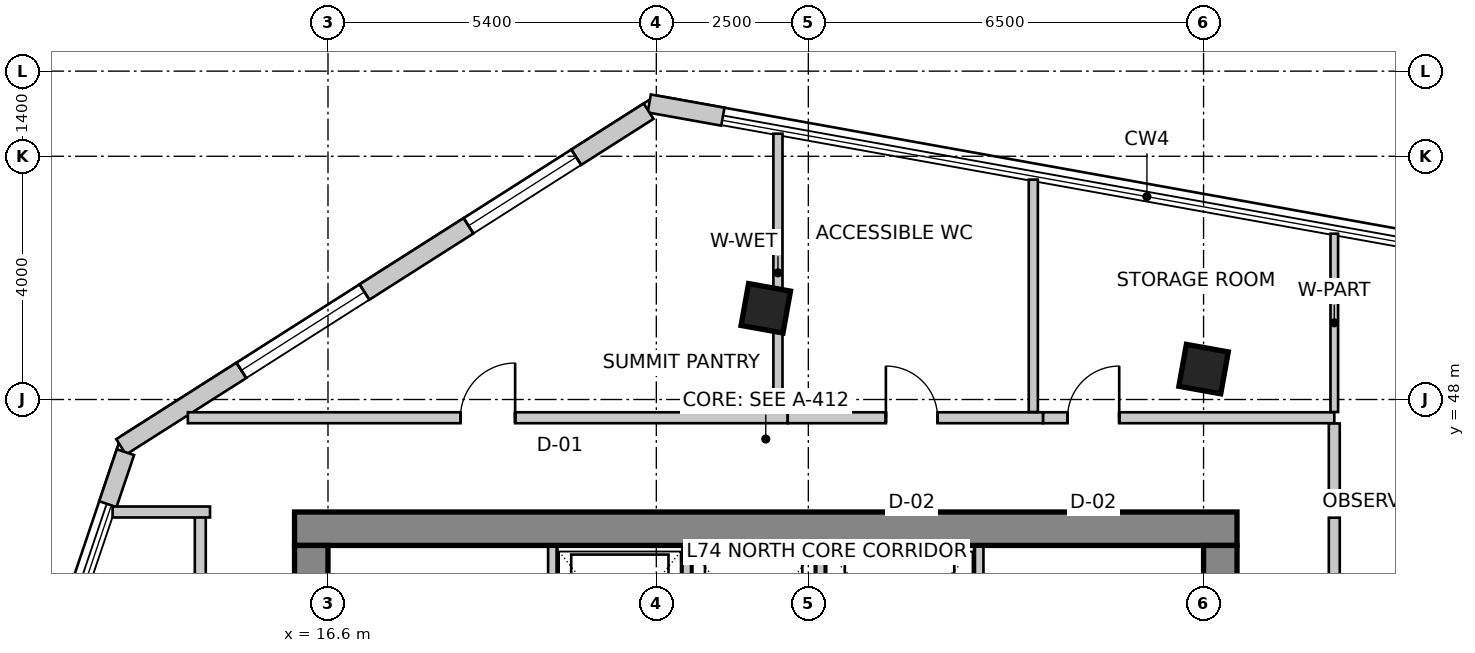
"""IFC4 building model, lengths in metres.
Left out: names, types, materials, properties, quantities, classifications, styles, units other than length and angle.
Written with IfcOpenShell. Run it as: python <this file> out.ifc"""

import sys

from ifc_helpers import new_model, si_unit, direction, frame, frame_2d, origin, origin_2d, place, context, subcontext, project, spatial, rectangle, extrude, source, transform, mapped, element, fill, save


model = new_model("IFC4")
c1 = context("Model", 3, precision=1e-05, world=origin(), true_north=direction((0.0, 1.0)))
c2 = subcontext(c1, "Body", "Model", "MODEL_VIEW")
j1 = project(units=[si_unit("LENGTHUNIT", "METRE"), si_unit("PLANEANGLEUNIT", "RADIAN")], contexts=[c1])
p1 = place(None, origin())
s1 = spatial("IfcSite", under=j1, at=p1, CompositionType="ELEMENT")
p2 = place(p1, origin())
s2 = spatial("IfcBuilding", under=s1, at=p2, CompositionType="ELEMENT")
p3 = place(p2, frame((0.0, 0.0, 288.9)))
s3 = spatial("IfcBuildingStorey", under=s2, at=p3, CompositionType="ELEMENT", Elevation=288.9)
p4 = place(p3, frame((16.05, 45.875, 0.0), z_axis=(0.0, 0.0, 1.0), x_axis=(1.0, 0.0, 0.0)))
e1 = element("IfcWall", 1, at=p4, inside=s3, PredefinedType="SHEAR", context=c2, shape_type="SweptSolid", body=[
    extrude(rectangle(XDim=15.5, YDim=0.55, at=frame_2d((7.75, 0.0))), origin(), (0.0, 0.0, 1.0), 3.6),
])
p5 = place(p3, frame((16.325, 34.2, 0.0), z_axis=(0.0, 0.0, 1.0), x_axis=(0.0, 1.0, 0.0)))
e2 = element("IfcWall", 2, at=p5, inside=s3, PredefinedType="SHEAR", context=c2, shape_type="SweptSolid", body=[
    extrude(rectangle(XDim=11.4, YDim=0.55, at=frame_2d((5.7, 0.0))), origin(), (0.0, 0.0, 1.0), 3.6),
])
m1 = source(origin(), c2, "Body", "SweptSolid", [
    extrude(rectangle(XDim=1.1, YDim=2.15, at=frame_2d((0.55, 1.075))), frame((0.0, 0.285, 0.0), z_axis=(0.0, -1.0, 0.0), x_axis=(1.0, 0.0, 0.0)), (0.0, 0.0, 1.0), 0.57),
])
p6 = place(p5, frame((7.15, 0.0, 0.0)))
e3 = element("IfcOpeningElement", 3, at=p6, cuts=e2, PredefinedType="OPENING", context=c2, shape_type="MappedRepresentation", body=[
    mapped(m1, transform((0.0, 0.0, 0.0), scale=1.0)),
])
p7 = place(p3, frame((31.275, 34.2, 0.0), z_axis=(0.0, 0.0, 1.0), x_axis=(0.0, 1.0, 0.0)))
e4 = element("IfcWall", 4, at=p7, inside=s3, PredefinedType="SHEAR", context=c2, shape_type="SweptSolid", body=[
    extrude(rectangle(XDim=11.4, YDim=0.55, at=frame_2d((5.7, 0.0))), origin(), (0.0, 0.0, 1.0), 3.6),
])
p8 = place(p7, frame((7.35, 0.0, 0.0)))
e5 = element("IfcOpeningElement", 5, at=p8, cuts=e4, PredefinedType="OPENING", context=c2, shape_type="MappedRepresentation", body=[
    mapped(m1, transform((0.0, 0.0, 0.0), scale=1.0)),
])
m2 = source(origin(), c2, "Body", "SweptSolid", [
    extrude(rectangle(XDim=0.7, YDim=0.7, at=origin_2d()), origin(), (0.0, 0.0, 1.0), 3.6),
])
for number, where, z_axis, x_axis in (
    (6, (23.8, 49.5, 0.0), (0.0, 0.0, 1.0), (0.984, -0.177, 0.0)),
    (7, (31.0, 48.5, 0.0), (0.0, 0.0, 1.0), (0.984, -0.177, 0.0)),
):
    element("IfcColumn", number, at=place(p3, frame(where, z_axis=z_axis, x_axis=x_axis)), inside=s3, PredefinedType="COLUMN", context=c2, shape_type="MappedRepresentation", body=[
        mapped(m2, transform((0.0, 0.0, 0.0), scale=1.0)),
    ])
p9 = place(p3, frame((23.094, 52.651, 0.0), z_axis=(0.0, 0.0, 1.0), x_axis=(-0.984233125072, 0.176876102146, 0.0)))
e8 = element("IfcWall", 8, at=p9, inside=s3, PredefinedType="SOLIDWALL", context=c2, shape_type="SweptSolid", body=[
    extrude(rectangle(XDim=1.23, YDim=0.3, at=frame_2d((0.615, 0.0))), origin(), (0.0, 0.0, 1.0), 3.35),
])
p10 = place(p3, frame((21.873, 52.741, 0.0), z_axis=(0.0, 0.0, 1.0), x_axis=(-0.843661487732, -0.536875492193, 0.0)))
e9 = element("IfcWall", 9, at=p10, inside=s3, PredefinedType="SOLIDWALL", context=c2, shape_type="SweptSolid", body=[
    extrude(rectangle(XDim=10.282, YDim=0.3, at=frame_2d((5.141, 0.0))), origin(), (0.0, 0.0, 1.0), 3.35),
])
m3 = source(origin(), c2, "Body", "SweptSolid", [
    extrude(rectangle(XDim=2.1, YDim=2.0, at=frame_2d((1.05, 1.0))), frame((0.0, 0.16, 0.0), z_axis=(0.0, -1.0, 0.0), x_axis=(1.0, 0.0, 0.0)), (0.0, 0.0, 1.0), 0.32),
])
p11 = place(p10, frame((1.41, 0.0, 0.85)))
e10 = element("IfcOpeningElement", 10, at=p11, cuts=e9, PredefinedType="OPENING", context=c2, shape_type="MappedRepresentation", body=[
    mapped(m3, transform((0.0, 0.0, 0.0), scale=1.0)),
])
m4 = source(origin(), c2, "Body", "SweptSolid", [
    extrude(rectangle(XDim=2.4, YDim=2.2, at=frame_2d((1.2, 1.1))), frame((0.0, 0.16, 0.0), z_axis=(0.0, -1.0, 0.0), x_axis=(1.0, 0.0, 0.0)), (0.0, 0.0, 1.0), 0.32),
])
p12 = place(p10, frame((5.539, 0.0, 0.85)))
e11 = element("IfcOpeningElement", 11, at=p12, cuts=e9, PredefinedType="OPENING", context=c2, shape_type="MappedRepresentation", body=[
    mapped(m4, transform((0.0, 0.0, 0.0), scale=1.0)),
])
p13 = place(p3, frame((13.269, 47.134, 0.0), z_axis=(0.0, 0.0, 1.0), x_axis=(-0.31995770778, -0.947431826166, 0.0)))
e12 = element("IfcWall", 12, at=p13, inside=s3, PredefinedType="SOLIDWALL", context=c2, shape_type="SweptSolid", body=[
    extrude(rectangle(XDim=0.903, YDim=0.3, at=frame_2d((0.451, 0.0))), origin(), (0.0, 0.0, 1.0), 3.35),
])
for number, where, z_axis, x_axis in (
    (13, (20.29, 43.28, 0.0), (0.0, 0.0, 1.0), (0.0, 1.0, 0.0)),
    (14, (27.31, 43.28, 0.0), (0.0, 0.0, 1.0), (0.0, 1.0, 0.0)),
):
    element("IfcWall", number, at=place(p3, frame(where, z_axis=z_axis, x_axis=x_axis)), inside=s3, PredefinedType="SOLIDWALL", context=c2, shape_type="SweptSolid", body=[
        extrude(rectangle(XDim=2.3, YDim=0.14, at=frame_2d((1.15, 0.0))), origin(), (0.0, 0.0, 1.0), 3.35),
    ])
for number, where, z_axis, x_axis in (
    (15, (22.5, 43.02, 0.0), (0.0, 0.0, 1.0), (0.0, 1.0, 0.0)),
    (16, (24.7, 43.02, 0.0), (0.0, 0.0, 1.0), (0.0, 1.0, 0.0)),
):
    element("IfcWall", number, at=place(p3, frame(where, z_axis=z_axis, x_axis=x_axis)), inside=s3, PredefinedType="SOLIDWALL", context=c2, shape_type="SweptSolid", body=[
        extrude(rectangle(XDim=2.56, YDim=0.14, at=frame_2d((1.28, 0.0))), origin(), (0.0, 0.0, 1.0), 3.35),
    ])
p14 = place(p3, frame((14.5, 33.744, 0.0), z_axis=(0.0, 0.0, 1.0), x_axis=(0.0, 1.0, 0.0)))
e17 = element("IfcWall", 17, at=p14, inside=s3, PredefinedType="PARTITIONING", context=c2, shape_type="SweptSolid", body=[
    extrude(rectangle(XDim=12.406, YDim=0.18, at=frame_2d((6.203, 0.0))), origin(), (0.0, 0.0, 1.0), 3.35),
])
m5 = source(origin(), c2, "Body", "SweptSolid", [
    extrude(rectangle(XDim=0.9, YDim=2.15, at=frame_2d((0.45, 1.075))), frame((0.0, 0.1, 0.0), z_axis=(0.0, -1.0, 0.0), x_axis=(1.0, 0.0, 0.0)), (0.0, 0.0, 1.0), 0.2),
])
p15 = place(p14, frame((4.37, 0.0, 0.0)))
e18 = element("IfcOpeningElement", 18, at=p15, cuts=e17, PredefinedType="OPENING", context=c2, shape_type="MappedRepresentation", body=[
    mapped(m5, transform((0.0, 0.0, 0.0), scale=1.0)),
])
p16 = place(p3, frame((14.66, 46.15, 0.0), z_axis=(0.0, 0.0, 1.0), x_axis=(-1.0, 0.0, 0.0)))
e19 = element("IfcWall", 19, at=p16, inside=s3, PredefinedType="PARTITIONING", context=c2, shape_type="SweptSolid", body=[
    extrude(rectangle(XDim=1.602, YDim=0.18, at=frame_2d((0.801, 0.0))), origin(), (0.0, 0.0, 1.0), 3.35),
])
p17 = place(p3, frame((14.295, 47.7, 0.0), z_axis=(0.0, 0.0, 1.0), x_axis=(1.0, 0.0, 0.0)))
e20 = element("IfcWall", 20, at=p17, inside=s3, PredefinedType="PARTITIONING", context=c2, shape_type="SweptSolid", body=[
    extrude(rectangle(XDim=9.865, YDim=0.18, at=frame_2d((4.932, 0.0))), origin(), (0.0, 0.0, 1.0), 3.034),
])
p18 = place(p17, frame((4.482, 0.0, 0.0)))
e21 = element("IfcOpeningElement", 21, at=p18, cuts=e20, PredefinedType="OPENING", context=c2, shape_type="MappedRepresentation", body=[
    mapped(m5, transform((0.0, 0.0, 0.0), scale=1.0)),
])
p19 = place(p3, frame((24.162, 47.7, 0.0), z_axis=(0.0, 0.0, 1.0), x_axis=(1.0, 0.0, 0.0)))
e22 = element("IfcWall", 22, at=p19, inside=s3, PredefinedType="PARTITIONING", context=c2, shape_type="SweptSolid", body=[
    extrude(rectangle(XDim=4.198, YDim=0.18, at=frame_2d((2.099, 0.0))), origin(), (0.0, 0.0, 1.0), 3.35),
])
m6 = source(origin(), c2, "Body", "SweptSolid", [
    extrude(rectangle(XDim=0.85, YDim=2.15, at=frame_2d((0.425, 1.075))), frame((0.0, 0.1, 0.0), z_axis=(0.0, -1.0, 0.0), x_axis=(1.0, 0.0, 0.0)), (0.0, 0.0, 1.0), 0.2),
])
p20 = place(p19, frame((1.613, 0.0, 0.0)))
e23 = element("IfcOpeningElement", 23, at=p20, cuts=e22, PredefinedType="OPENING", context=c2, shape_type="MappedRepresentation", body=[
    mapped(m6, transform((0.0, 0.0, 0.0), scale=1.0)),
])
p21 = place(p3, frame((28.362, 47.7, 0.0), z_axis=(0.0, 0.0, 1.0), x_axis=(1.0, 0.0, 0.0)))
e24 = element("IfcWall", 24, at=p21, inside=s3, PredefinedType="PARTITIONING", context=c2, shape_type="SweptSolid", body=[
    extrude(rectangle(XDim=4.788, YDim=0.18, at=frame_2d((2.394, 0.0))), origin(), (0.0, 0.0, 1.0), 2.922),
])
p22 = place(p21, frame((0.401, 0.0, 0.0)))
e25 = element("IfcOpeningElement", 25, at=p22, cuts=e24, PredefinedType="OPENING", context=c2, shape_type="MappedRepresentation", body=[
    mapped(m6, transform((0.0, 0.0, 0.0), scale=1.0)),
])
p23 = place(p3, frame((33.15, 47.606, 0.0), z_axis=(0.0, 0.0, 1.0), x_axis=(0.0, -1.0, 0.0)))
e26 = element("IfcWall", 26, at=p23, inside=s3, PredefinedType="PARTITIONING", context=c2, shape_type="SweptSolid", body=[
    extrude(rectangle(XDim=1.456, YDim=0.18, at=frame_2d((0.728, 0.0))), origin(), (0.0, 0.0, 1.0), 3.35),
])
p24 = place(p3, frame((33.15, 46.056, 0.0), z_axis=(0.0, 0.0, 1.0), x_axis=(0.0, -1.0, 0.0)))
e27 = element("IfcWall", 27, at=p24, inside=s3, PredefinedType="PARTITIONING", context=c2, shape_type="SweptSolid", body=[
    extrude(rectangle(XDim=5.716, YDim=0.18, at=frame_2d((2.858, 0.0))), origin(), (0.0, 0.0, 1.0), 2.922),
])
m7 = source(origin(), c2, "Body", "SweptSolid", [
    extrude(rectangle(XDim=1.4, YDim=2.15, at=frame_2d((0.7, 1.075))), frame((0.0, 0.1, 0.0), z_axis=(0.0, -1.0, 0.0), x_axis=(1.0, 0.0, 0.0)), (0.0, 0.0, 1.0), 0.2),
])
p25 = place(p24, frame((2.219, 0.0, 0.0)))
e28 = element("IfcOpeningElement", 28, at=p25, cuts=e27, PredefinedType="OPENING", context=c2, shape_type="MappedRepresentation", body=[
    mapped(m7, transform((0.0, 0.0, 0.0), scale=1.0)),
])
p26 = place(p3, frame((24.0, 52.371, 0.0), z_axis=(0.0, 0.0, 1.0), x_axis=(0.0, -1.0, 0.0)))
e29 = element("IfcWall", 29, at=p26, inside=s3, PredefinedType="PARTITIONING", context=c2, shape_type="SweptSolid", body=[
    extrude(rectangle(XDim=4.577, YDim=0.15, at=frame_2d((2.289, 0.0))), origin(), (0.0, 0.0, 1.0), 2.642),
])
p27 = place(p3, frame((28.2, 51.616, 0.0), z_axis=(0.0, 0.0, 1.0), x_axis=(0.0, -1.0, 0.0)))
e30 = element("IfcWall", 30, at=p27, inside=s3, PredefinedType="PARTITIONING", context=c2, shape_type="SweptSolid", body=[
    extrude(rectangle(XDim=3.822, YDim=0.15, at=frame_2d((1.911, 0.0))), origin(), (0.0, 0.0, 1.0), 2.642),
])
p28 = place(p3, frame((33.15, 50.727, 0.0), z_axis=(0.0, 0.0, 1.0), x_axis=(0.0, -1.0, 0.0)))
e31 = element("IfcWall", 31, at=p28, inside=s3, PredefinedType="PARTITIONING", context=c2, shape_type="SweptSolid", body=[
    extrude(rectangle(XDim=2.933, YDim=0.125, at=frame_2d((1.466, 0.0))), origin(), (0.0, 0.0, 1.0), 2.642),
])
m8 = source(origin(), c2, "Body", "SweptSolid", [
    extrude(rectangle(XDim=2.1, YDim=2.0, at=frame_2d((1.05, 1.0))), frame((0.0, -0.015, 0.0), z_axis=(0.0, -1.0, 0.0), x_axis=(1.0, 0.0, 0.0)), (0.0, 0.0, 1.0), 0.06),
])
p29 = place(p11, origin())
e32 = element("IfcWindow", 32, at=p29, inside=s3, PartitioningType="SINGLE_PANEL", PredefinedType="WINDOW", context=c2, shape_type="MappedRepresentation", body=[
    mapped(m8, transform((0.0, 0.0, 0.0), scale=1.0)),
])
fill(e10, e32)
m9 = source(origin(), c2, "Body", "SweptSolid", [
    extrude(rectangle(XDim=2.4, YDim=2.2, at=frame_2d((1.2, 1.1))), frame((0.0, -0.015, 0.0), z_axis=(0.0, -1.0, 0.0), x_axis=(1.0, 0.0, 0.0)), (0.0, 0.0, 1.0), 0.06),
])
p30 = place(p12, origin())
e33 = element("IfcWindow", 33, at=p30, inside=s3, PartitioningType="SINGLE_PANEL", PredefinedType="WINDOW", context=c2, shape_type="MappedRepresentation", body=[
    mapped(m9, transform((0.0, 0.0, 0.0), scale=1.0)),
])
fill(e11, e33)
m10 = source(origin(), c2, "Body", "SweptSolid", [
    extrude(rectangle(XDim=0.9, YDim=2.15, at=frame_2d((0.45, 1.075))), frame((0.0, 0.025, 0.0), z_axis=(0.0, -1.0, 0.0), x_axis=(1.0, 0.0, 0.0)), (0.0, 0.0, 1.0), 0.05),
])
p31 = place(p18, origin())
e34 = element("IfcDoor", 34, at=p31, inside=s3, OperationType="SINGLE_SWING_RIGHT", PredefinedType="DOOR", context=c2, shape_type="MappedRepresentation", body=[
    mapped(m10, transform((0.0, 0.0, 0.0), scale=1.0)),
])
fill(e21, e34)
m11 = source(origin(), c2, "Body", "SweptSolid", [
    extrude(rectangle(XDim=0.85, YDim=2.15, at=frame_2d((0.425, 1.075))), frame((0.0, 0.025, 0.0), z_axis=(0.0, -1.0, 0.0), x_axis=(1.0, 0.0, 0.0)), (0.0, 0.0, 1.0), 0.05),
])
p32 = place(p20, origin())
e35 = element("IfcDoor", 35, at=p32, inside=s3, OperationType="SINGLE_SWING_LEFT", PredefinedType="DOOR", context=c2, shape_type="MappedRepresentation", body=[
    mapped(m11, transform((0.0, 0.0, 0.0), scale=1.0)),
])
fill(e23, e35)
p33 = place(p22, origin())
e36 = element("IfcDoor", 36, at=p33, inside=s3, OperationType="SINGLE_SWING_RIGHT", PredefinedType="DOOR", context=c2, shape_type="MappedRepresentation", body=[
    mapped(m11, transform((0.0, 0.0, 0.0), scale=1.0)),
])
fill(e25, e36)
save(model, sys.argv[1])
